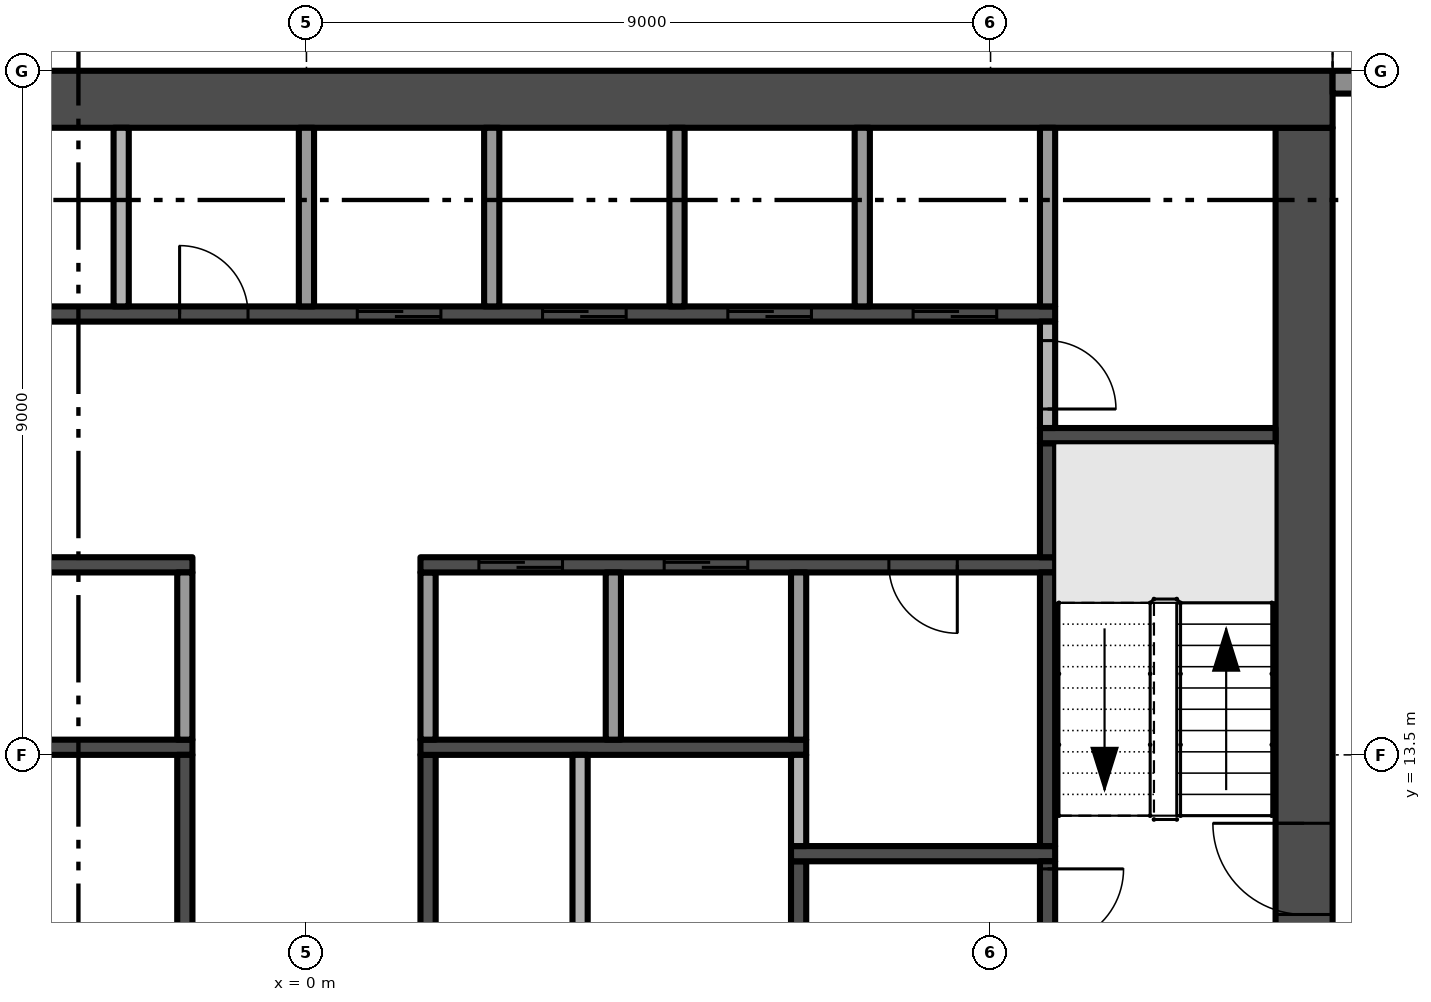
"""IFC4 building model, lengths in metres.
Left out: names, types, materials, properties, quantities, classifications, styles, units other than length and angle.
Written with IfcOpenShell. Run it as: python <this file> out.ifc"""

import sys

from ifc_helpers import new_model, si_unit, direction, frame, frame_2d, origin, place, context, subcontext, project, spatial, rectangle, extrude, element, fill, save


model = new_model("IFC4")
c1 = context("Model", 3, precision=1e-05, world=origin(), true_north=direction((0.0, 1.0)))
c2 = subcontext(c1, "Body", "Model", "MODEL_VIEW")
j1 = project(units=[si_unit("LENGTHUNIT", "METRE"), si_unit("PLANEANGLEUNIT", "RADIAN")], contexts=[c1])
p1 = place(None, origin())
s1 = spatial("IfcSite", under=j1, at=p1, CompositionType="ELEMENT")
p2 = place(p1, origin())
s2 = spatial("IfcBuilding", under=s1, at=p2, CompositionType="ELEMENT")
p3 = place(p2, frame((0.0, 0.0, 163.0)))
s3 = spatial("IfcBuildingStorey", under=s2, at=p3, CompositionType="ELEMENT", Elevation=163.0)
p4 = place(p3, frame((13.125, 5.25, -0.3), z_axis=(0.0, 0.0, 1.0), x_axis=(0.0, 1.0, 0.0)))
e1 = element("IfcWall", 1, at=p4, inside=s3, PredefinedType="SHEAR", context=c2, shape_type="SweptSolid", body=[
    extrude(rectangle(XDim=16.5, YDim=0.75, at=frame_2d((8.25, 0.0))), origin(), (0.0, 0.0, 1.0), 3.8),
])
p5 = place(p4, frame((6.15, 0.0, 0.3)))
e2 = element("IfcOpeningElement", 2, at=p5, cuts=e1, PredefinedType="OPENING", context=c2, shape_type="SweptSolid", body=[
    extrude(rectangle(XDim=1.2, YDim=2.2, at=frame_2d((0.6, 1.1))), frame((0.0, 0.385, 0.0), z_axis=(0.0, -1.0, 0.0), x_axis=(1.0, 0.0, 0.0)), (0.0, 0.0, 1.0), 0.77),
])
p6 = place(p3, frame((13.5, 22.125, -0.3), z_axis=(0.0, 0.0, 1.0), x_axis=(-1.0, 0.0, 0.0)))
e3 = element("IfcWall", 3, at=p6, inside=s3, PredefinedType="SHEAR", context=c2, shape_type="SweptSolid", body=[
    extrude(rectangle(XDim=27.0, YDim=0.75, at=frame_2d((13.5, 0.0))), origin(), (0.0, 0.0, 1.0), 3.8),
])
p7 = place(p3, frame((13.5, 22.35, 0.0), z_axis=(0.0, 0.0, 1.0), x_axis=(1.0, 0.0, 0.0)))
e4 = element("IfcWall", 4, at=p7, inside=s3, PredefinedType="SOLIDWALL", context=c2, shape_type="SweptSolid", body=[
    extrude(rectangle(XDim=3.4, YDim=0.3, at=frame_2d((1.7, 0.0))), origin(), (0.0, 0.0, 1.0), 3.5),
])
p8 = place(p7, frame((2.05, 0.0, 0.45)))
e5 = element("IfcOpeningElement", 5, at=p8, cuts=e4, PredefinedType="OPENING", context=c2, shape_type="SweptSolid", body=[
    extrude(rectangle(XDim=1.05, YDim=2.65, at=frame_2d((0.525, 1.325))), frame((0.0, 0.16, 0.0), z_axis=(0.0, -1.0, 0.0), x_axis=(1.0, 0.0, 0.0)), (0.0, 0.0, 1.0), 0.32),
])
p9 = place(p7, frame((0.7, 0.0, 0.0)))
e6 = element("IfcOpeningElement", 6, at=p9, cuts=e4, PredefinedType="OPENING", context=c2, shape_type="SweptSolid", body=[
    extrude(rectangle(XDim=1.2, YDim=2.4, at=frame_2d((0.6, 1.2))), frame((0.0, 0.16, 0.0), z_axis=(0.0, -1.0, 0.0), x_axis=(1.0, 0.0, 0.0)), (0.0, 0.0, 1.0), 0.32),
])
p10 = place(p3, frame((-9.85, 13.6, 0.0), z_axis=(0.0, 0.0, 1.0), x_axis=(1.0, 0.0, 0.0)))
e7 = element("IfcWall", 7, at=p10, inside=s3, PredefinedType="SHEAR", context=c2, shape_type="SweptSolid", body=[
    extrude(rectangle(XDim=8.35, YDim=0.2, at=frame_2d((4.175, 0.0))), origin(), (0.0, 0.0, 1.0), 3.5),
])
p11 = place(p3, frame((-1.5, 16.0, 0.0), z_axis=(0.0, 0.0, 1.0), x_axis=(-1.0, 0.0, 0.0)))
e8 = element("IfcWall", 8, at=p11, inside=s3, PredefinedType="SHEAR", context=c2, shape_type="SweptSolid", body=[
    extrude(rectangle(XDim=8.35, YDim=0.2, at=frame_2d((4.175, 0.0))), origin(), (0.0, 0.0, 1.0), 3.5),
])
p12 = place(p11, frame((6.162, 0.0, 0.0)))
e9 = element("IfcOpeningElement", 9, at=p12, cuts=e8, PredefinedType="OPENING", context=c2, shape_type="SweptSolid", body=[
    extrude(rectangle(XDim=0.9, YDim=2.1, at=frame_2d((0.45, 1.05))), frame((0.0, 0.11, 0.0), z_axis=(0.0, -1.0, 0.0), x_axis=(1.0, 0.0, 0.0)), (0.0, 0.0, 1.0), 0.22),
])
p13 = place(p3, frame((-9.85, 19.3, 0.0), z_axis=(0.0, 0.0, 1.0), x_axis=(1.0, 0.0, 0.0)))
e10 = element("IfcWall", 10, at=p13, inside=s3, PredefinedType="SHEAR", context=c2, shape_type="SweptSolid", body=[
    extrude(rectangle(XDim=19.7, YDim=0.2, at=frame_2d((9.85, 0.0))), origin(), (0.0, 0.0, 1.0), 3.5),
])
p14 = place(p13, frame((10.519, 0.0, 0.0)))
e11 = element("IfcOpeningElement", 11, at=p14, cuts=e10, PredefinedType="OPENING", context=c2, shape_type="SweptSolid", body=[
    extrude(rectangle(XDim=1.1, YDim=2.1, at=frame_2d((0.55, 1.05))), frame((0.0, 0.11, 0.0), z_axis=(0.0, -1.0, 0.0), x_axis=(1.0, 0.0, 0.0)), (0.0, 0.0, 1.0), 0.22),
])
p15 = place(p13, frame((12.956, 0.0, 0.0)))
e12 = element("IfcOpeningElement", 12, at=p15, cuts=e10, PredefinedType="OPENING", context=c2, shape_type="SweptSolid", body=[
    extrude(rectangle(XDim=1.1, YDim=2.1, at=frame_2d((0.55, 1.05))), frame((0.0, 0.11, 0.0), z_axis=(0.0, -1.0, 0.0), x_axis=(1.0, 0.0, 0.0)), (0.0, 0.0, 1.0), 0.22),
])
p16 = place(p13, frame((15.394, 0.0, 0.0)))
e13 = element("IfcOpeningElement", 13, at=p16, cuts=e10, PredefinedType="OPENING", context=c2, shape_type="SweptSolid", body=[
    extrude(rectangle(XDim=1.1, YDim=2.1, at=frame_2d((0.55, 1.05))), frame((0.0, 0.11, 0.0), z_axis=(0.0, -1.0, 0.0), x_axis=(1.0, 0.0, 0.0)), (0.0, 0.0, 1.0), 0.22),
])
p17 = place(p13, frame((17.831, 0.0, 0.0)))
e14 = element("IfcOpeningElement", 14, at=p17, cuts=e10, PredefinedType="OPENING", context=c2, shape_type="SweptSolid", body=[
    extrude(rectangle(XDim=1.1, YDim=2.1, at=frame_2d((0.55, 1.05))), frame((0.0, 0.11, 0.0), z_axis=(0.0, -1.0, 0.0), x_axis=(1.0, 0.0, 0.0)), (0.0, 0.0, 1.0), 0.22),
])
p18 = place(p13, frame((0.869, 0.0, 0.0)))
e15 = element("IfcOpeningElement", 15, at=p18, cuts=e10, PredefinedType="OPENING", context=c2, shape_type="SweptSolid", body=[
    extrude(rectangle(XDim=0.9, YDim=2.1, at=frame_2d((0.45, 1.05))), frame((0.0, 0.11, 0.0), z_axis=(0.0, -1.0, 0.0), x_axis=(1.0, 0.0, 0.0)), (0.0, 0.0, 1.0), 0.22),
])
p19 = place(p13, frame((4.525, 0.0, 0.0)))
e16 = element("IfcOpeningElement", 16, at=p19, cuts=e10, PredefinedType="OPENING", context=c2, shape_type="SweptSolid", body=[
    extrude(rectangle(XDim=0.9, YDim=2.1, at=frame_2d((0.45, 1.05))), frame((0.0, 0.11, 0.0), z_axis=(0.0, -1.0, 0.0), x_axis=(1.0, 0.0, 0.0)), (0.0, 0.0, 1.0), 0.22),
])
p20 = place(p13, frame((8.181, 0.0, 0.0)))
e17 = element("IfcOpeningElement", 17, at=p20, cuts=e10, PredefinedType="OPENING", context=c2, shape_type="SweptSolid", body=[
    extrude(rectangle(XDim=0.9, YDim=2.1, at=frame_2d((0.45, 1.05))), frame((0.0, 0.11, 0.0), z_axis=(0.0, -1.0, 0.0), x_axis=(1.0, 0.0, 0.0)), (0.0, 0.0, 1.0), 0.22),
])
p21 = place(p3, frame((-2.438, 19.4, 0.0), z_axis=(0.0, 0.0, 1.0), x_axis=(0.0, 1.0, 0.0)))
e18 = element("IfcWall", 18, at=p21, inside=s3, PredefinedType="PARTITIONING", context=c2, shape_type="SweptSolid", body=[
    extrude(rectangle(XDim=2.35, YDim=0.2, at=frame_2d((1.175, 0.0))), origin(), (0.0, 0.0, 1.0), 3.5),
])
p22 = place(p3, frame((-1.6, 8.15, 0.0), z_axis=(0.0, 0.0, 1.0), x_axis=(0.0, 1.0, 0.0)))
e19 = element("IfcWall", 19, at=p22, inside=s3, PredefinedType="SHEAR", context=c2, shape_type="SweptSolid", body=[
    extrude(rectangle(XDim=5.35, YDim=0.2, at=frame_2d((2.675, 0.0))), origin(), (0.0, 0.0, 1.0), 3.5),
])
p23 = place(p22, frame((2.225, 0.0, 0.0)))
e20 = element("IfcOpeningElement", 20, at=p23, cuts=e19, PredefinedType="OPENING", context=c2, shape_type="SweptSolid", body=[
    extrude(rectangle(XDim=0.9, YDim=2.1, at=frame_2d((0.45, 1.05))), frame((0.0, 0.11, 0.0), z_axis=(0.0, -1.0, 0.0), x_axis=(1.0, 0.0, 0.0)), (0.0, 0.0, 1.0), 0.22),
])
p24 = place(p3, frame((-1.6, 13.7, 0.0), z_axis=(0.0, 0.0, 1.0), x_axis=(0.0, 1.0, 0.0)))
e21 = element("IfcWall", 21, at=p24, inside=s3, PredefinedType="PARTITIONING", context=c2, shape_type="SweptSolid", body=[
    extrude(rectangle(XDim=2.2, YDim=0.2, at=frame_2d((1.1, 0.0))), origin(), (0.0, 0.0, 1.0), 3.5),
])
p25 = place(p3, frame((0.0, 19.4, 0.0), z_axis=(0.0, 0.0, 1.0), x_axis=(0.0, 1.0, 0.0)))
e22 = element("IfcWall", 22, at=p25, inside=s3, PredefinedType="PARTITIONING", context=c2, shape_type="SweptSolid", body=[
    extrude(rectangle(XDim=2.35, YDim=0.2, at=frame_2d((1.175, 0.0))), origin(), (0.0, 0.0, 1.0), 3.5),
])
p26 = place(p3, frame((1.6, 13.5, 0.0), z_axis=(0.0, 0.0, 1.0), x_axis=(0.0, -1.0, 0.0)))
e23 = element("IfcWall", 23, at=p26, inside=s3, PredefinedType="SHEAR", context=c2, shape_type="SweptSolid", body=[
    extrude(rectangle(XDim=8.25, YDim=0.2, at=frame_2d((4.125, 0.0))), origin(), (0.0, 0.0, 1.0), 3.5),
])
p27 = place(p26, frame((3.275, 0.0, 0.0)))
e24 = element("IfcOpeningElement", 24, at=p27, cuts=e23, PredefinedType="OPENING", context=c2, shape_type="SweptSolid", body=[
    extrude(rectangle(XDim=0.9, YDim=2.1, at=frame_2d((0.45, 1.05))), frame((0.0, 0.11, 0.0), z_axis=(0.0, -1.0, 0.0), x_axis=(1.0, 0.0, 0.0)), (0.0, 0.0, 1.0), 0.22),
])
p28 = place(p3, frame((1.5, 13.6, 0.0), z_axis=(0.0, 0.0, 1.0), x_axis=(1.0, 0.0, 0.0)))
e25 = element("IfcWall", 25, at=p28, inside=s3, PredefinedType="SHEAR", context=c2, shape_type="SweptSolid", body=[
    extrude(rectangle(XDim=5.075, YDim=0.2, at=frame_2d((2.538, 0.0))), origin(), (0.0, 0.0, 1.0), 3.5),
])
p29 = place(p3, frame((1.6, 13.7, 0.0), z_axis=(0.0, 0.0, 1.0), x_axis=(0.0, 1.0, 0.0)))
e26 = element("IfcWall", 26, at=p29, inside=s3, PredefinedType="PARTITIONING", context=c2, shape_type="SweptSolid", body=[
    extrude(rectangle(XDim=2.2, YDim=0.2, at=frame_2d((1.1, 0.0))), origin(), (0.0, 0.0, 1.0), 3.5),
])
p30 = place(p3, frame((9.85, 16.0, 0.0), z_axis=(0.0, 0.0, 1.0), x_axis=(-1.0, 0.0, 0.0)))
e27 = element("IfcWall", 27, at=p30, inside=s3, PredefinedType="SHEAR", context=c2, shape_type="SweptSolid", body=[
    extrude(rectangle(XDim=8.35, YDim=0.2, at=frame_2d((4.175, 0.0))), origin(), (0.0, 0.0, 1.0), 3.5),
])
p31 = place(p30, frame((6.481, 0.0, 0.0)))
e28 = element("IfcOpeningElement", 28, at=p31, cuts=e27, PredefinedType="OPENING", context=c2, shape_type="SweptSolid", body=[
    extrude(rectangle(XDim=1.1, YDim=2.1, at=frame_2d((0.55, 1.05))), frame((0.0, 0.11, 0.0), z_axis=(0.0, -1.0, 0.0), x_axis=(1.0, 0.0, 0.0)), (0.0, 0.0, 1.0), 0.22),
])
p32 = place(p30, frame((4.044, 0.0, 0.0)))
e29 = element("IfcOpeningElement", 29, at=p32, cuts=e27, PredefinedType="OPENING", context=c2, shape_type="SweptSolid", body=[
    extrude(rectangle(XDim=1.1, YDim=2.1, at=frame_2d((0.55, 1.05))), frame((0.0, 0.11, 0.0), z_axis=(0.0, -1.0, 0.0), x_axis=(1.0, 0.0, 0.0)), (0.0, 0.0, 1.0), 0.22),
])
p33 = place(p30, frame((1.288, 0.0, 0.0)))
e30 = element("IfcOpeningElement", 30, at=p33, cuts=e27, PredefinedType="OPENING", context=c2, shape_type="SweptSolid", body=[
    extrude(rectangle(XDim=0.9, YDim=2.1, at=frame_2d((0.45, 1.05))), frame((0.0, 0.11, 0.0), z_axis=(0.0, -1.0, 0.0), x_axis=(1.0, 0.0, 0.0)), (0.0, 0.0, 1.0), 0.22),
])
p34 = place(p3, frame((2.438, 19.4, 0.0), z_axis=(0.0, 0.0, 1.0), x_axis=(0.0, 1.0, 0.0)))
e31 = element("IfcWall", 31, at=p34, inside=s3, PredefinedType="PARTITIONING", context=c2, shape_type="SweptSolid", body=[
    extrude(rectangle(XDim=2.35, YDim=0.2, at=frame_2d((1.175, 0.0))), origin(), (0.0, 0.0, 1.0), 3.5),
])
p35 = place(p3, frame((3.6, 13.5, 0.0), z_axis=(0.0, 0.0, 1.0), x_axis=(0.0, -1.0, 0.0)))
e32 = element("IfcWall", 32, at=p35, inside=s3, PredefinedType="PARTITIONING", context=c2, shape_type="SweptSolid", body=[
    extrude(rectangle(XDim=8.25, YDim=0.2, at=frame_2d((4.125, 0.0))), origin(), (0.0, 0.0, 1.0), 3.5),
])
p36 = place(p35, frame((3.675, 0.0, 0.0)))
e33 = element("IfcOpeningElement", 33, at=p36, cuts=e32, PredefinedType="OPENING", context=c2, shape_type="SweptSolid", body=[
    extrude(rectangle(XDim=0.9, YDim=2.1, at=frame_2d((0.45, 1.05))), frame((0.0, 0.11, 0.0), z_axis=(0.0, -1.0, 0.0), x_axis=(1.0, 0.0, 0.0)), (0.0, 0.0, 1.0), 0.22),
])
p37 = place(p3, frame((4.037, 13.7, 0.0), z_axis=(0.0, 0.0, 1.0), x_axis=(0.0, 1.0, 0.0)))
e34 = element("IfcWall", 34, at=p37, inside=s3, PredefinedType="PARTITIONING", context=c2, shape_type="SweptSolid", body=[
    extrude(rectangle(XDim=2.2, YDim=0.2, at=frame_2d((1.1, 0.0))), origin(), (0.0, 0.0, 1.0), 3.5),
])
p38 = place(p3, frame((4.875, 19.4, 0.0), z_axis=(0.0, 0.0, 1.0), x_axis=(0.0, 1.0, 0.0)))
e35 = element("IfcWall", 35, at=p38, inside=s3, PredefinedType="PARTITIONING", context=c2, shape_type="SweptSolid", body=[
    extrude(rectangle(XDim=2.35, YDim=0.2, at=frame_2d((1.175, 0.0))), origin(), (0.0, 0.0, 1.0), 3.5),
])
p39 = place(p3, frame((6.475, 5.25, 0.0), z_axis=(0.0, 0.0, 1.0), x_axis=(0.0, 1.0, 0.0)))
e36 = element("IfcWall", 36, at=p39, inside=s3, PredefinedType="SHEAR", context=c2, shape_type="SweptSolid", body=[
    extrude(rectangle(XDim=6.85, YDim=0.2, at=frame_2d((3.425, 0.0))), origin(), (0.0, 0.0, 1.0), 3.5),
])
p40 = place(p3, frame((6.375, 12.2, 0.0), z_axis=(0.0, 0.0, 1.0), x_axis=(1.0, 0.0, 0.0)))
e37 = element("IfcWall", 37, at=p40, inside=s3, PredefinedType="SHEAR", context=c2, shape_type="SweptSolid", body=[
    extrude(rectangle(XDim=3.475, YDim=0.2, at=frame_2d((1.738, 0.0))), origin(), (0.0, 0.0, 1.0), 3.5),
])
p41 = place(p3, frame((6.475, 12.3, 0.0), z_axis=(0.0, 0.0, 1.0), x_axis=(0.0, 1.0, 0.0)))
e38 = element("IfcWall", 38, at=p41, inside=s3, PredefinedType="PARTITIONING", context=c2, shape_type="SweptSolid", body=[
    extrude(rectangle(XDim=1.2, YDim=0.2, at=frame_2d((0.6, 0.0))), origin(), (0.0, 0.0, 1.0), 3.5),
])
p42 = place(p3, frame((6.475, 13.7, 0.0), z_axis=(0.0, 0.0, 1.0), x_axis=(0.0, 1.0, 0.0)))
e39 = element("IfcWall", 39, at=p42, inside=s3, PredefinedType="PARTITIONING", context=c2, shape_type="SweptSolid", body=[
    extrude(rectangle(XDim=2.2, YDim=0.2, at=frame_2d((1.1, 0.0))), origin(), (0.0, 0.0, 1.0), 3.5),
])
p43 = place(p3, frame((7.312, 19.4, 0.0), z_axis=(0.0, 0.0, 1.0), x_axis=(0.0, 1.0, 0.0)))
e40 = element("IfcWall", 40, at=p43, inside=s3, PredefinedType="PARTITIONING", context=c2, shape_type="SweptSolid", body=[
    extrude(rectangle(XDim=2.35, YDim=0.2, at=frame_2d((1.175, 0.0))), origin(), (0.0, 0.0, 1.0), 3.5),
])
p44 = place(p3, frame((9.75, 12.1, 0.0), z_axis=(0.0, 0.0, 1.0), x_axis=(0.0, -1.0, 0.0)))
e41 = element("IfcWall", 41, at=p44, inside=s3, PredefinedType="SHEAR", context=c2, shape_type="SweptSolid", body=[
    extrude(rectangle(XDim=1.9, YDim=0.2, at=frame_2d((0.95, 0.0))), origin(), (0.0, 0.0, 1.0), 3.5),
])
p45 = place(p44, frame((0.1, 0.0, 0.0)))
e42 = element("IfcOpeningElement", 42, at=p45, cuts=e41, PredefinedType="OPENING", context=c2, shape_type="SweptSolid", body=[
    extrude(rectangle(XDim=1.0, YDim=2.2, at=frame_2d((0.5, 1.1))), frame((0.0, 0.11, 0.0), z_axis=(0.0, -1.0, 0.0), x_axis=(1.0, 0.0, 0.0)), (0.0, 0.0, 1.0), 0.22),
])
p46 = place(p3, frame((9.75, 12.3, 0.0), z_axis=(0.0, 0.0, 1.0), x_axis=(0.0, 1.0, 0.0)))
e43 = element("IfcWall", 43, at=p46, inside=s3, PredefinedType="SHEAR", context=c2, shape_type="SweptSolid", body=[
    extrude(rectangle(XDim=3.6, YDim=0.2, at=frame_2d((1.8, 0.0))), origin(), (0.0, 0.0, 1.0), 3.5),
])
p47 = place(p3, frame((9.75, 16.1, 0.0), z_axis=(0.0, 0.0, 1.0), x_axis=(0.0, 1.0, 0.0)))
e44 = element("IfcWall", 44, at=p47, inside=s3, PredefinedType="SHEAR", context=c2, shape_type="SweptSolid", body=[
    extrude(rectangle(XDim=1.5, YDim=0.2, at=frame_2d((0.75, 0.0))), origin(), (0.0, 0.0, 1.0), 3.5),
])
p48 = place(p3, frame((9.65, 17.7, 0.0), z_axis=(0.0, 0.0, 1.0), x_axis=(1.0, 0.0, 0.0)))
e45 = element("IfcWall", 45, at=p48, inside=s3, PredefinedType="SHEAR", context=c2, shape_type="SweptSolid", body=[
    extrude(rectangle(XDim=3.1, YDim=0.2, at=frame_2d((1.55, 0.0))), origin(), (0.0, 0.0, 1.0), 3.5),
])
p49 = place(p3, frame((9.75, 19.2, 0.0), z_axis=(0.0, 0.0, 1.0), x_axis=(0.0, -1.0, 0.0)))
e46 = element("IfcWall", 46, at=p49, inside=s3, PredefinedType="PARTITIONING", context=c2, shape_type="SweptSolid", body=[
    extrude(rectangle(XDim=1.4, YDim=0.2, at=frame_2d((0.7, 0.0))), origin(), (0.0, 0.0, 1.0), 3.5),
])
p50 = place(p49, frame((0.25, 0.0, 0.0)))
e47 = element("IfcOpeningElement", 47, at=p50, cuts=e46, PredefinedType="OPENING", context=c2, shape_type="SweptSolid", body=[
    extrude(rectangle(XDim=0.9, YDim=2.1, at=frame_2d((0.45, 1.05))), frame((0.0, 0.11, 0.0), z_axis=(0.0, -1.0, 0.0), x_axis=(1.0, 0.0, 0.0)), (0.0, 0.0, 1.0), 0.22),
])
p51 = place(p3, frame((9.75, 19.4, 0.0), z_axis=(0.0, 0.0, 1.0), x_axis=(0.0, 1.0, 0.0)))
e48 = element("IfcWall", 48, at=p51, inside=s3, PredefinedType="PARTITIONING", context=c2, shape_type="SweptSolid", body=[
    extrude(rectangle(XDim=2.35, YDim=0.2, at=frame_2d((1.175, 0.0))), origin(), (0.0, 0.0, 1.0), 3.5),
])
p52 = place(p5, frame((1.2, 0.0, 0.0), z_axis=(0.0, 0.0, 1.0), x_axis=(-1.0, 0.0, 0.0)))
e49 = element("IfcDoor", 49, at=p52, inside=s3, OperationType="SINGLE_SWING_LEFT", PredefinedType="DOOR", context=c2, shape_type="SweptSolid", body=[
    extrude(rectangle(XDim=1.2, YDim=2.2, at=frame_2d((0.6, 1.1))), frame((0.0, 0.025, 0.0), z_axis=(0.0, -1.0, 0.0), x_axis=(1.0, 0.0, 0.0)), (0.0, 0.0, 1.0), 0.05),
])
fill(e2, e49)
p53 = place(p45, origin())
e50 = element("IfcDoor", 50, at=p53, inside=s3, OperationType="SINGLE_SWING_LEFT", PredefinedType="DOOR", context=c2, shape_type="SweptSolid", body=[
    extrude(rectangle(XDim=1.0, YDim=2.2, at=frame_2d((0.5, 1.1))), frame((0.0, 0.025, 0.0), z_axis=(0.0, -1.0, 0.0), x_axis=(1.0, 0.0, 0.0)), (0.0, 0.0, 1.0), 0.05),
])
fill(e42, e50)
p54 = place(p14, origin())
e51 = element("IfcDoor", 51, at=p54, inside=s3, OperationType="SLIDING_TO_RIGHT", PredefinedType="DOOR", context=c2, shape_type="SweptSolid", body=[
    extrude(rectangle(XDim=1.1, YDim=2.1, at=frame_2d((0.55, 1.05))), frame((0.0, 0.025, 0.0), z_axis=(0.0, -1.0, 0.0), x_axis=(1.0, 0.0, 0.0)), (0.0, 0.0, 1.0), 0.05),
])
fill(e11, e51)
p55 = place(p15, origin())
e52 = element("IfcDoor", 52, at=p55, inside=s3, OperationType="SLIDING_TO_RIGHT", PredefinedType="DOOR", context=c2, shape_type="SweptSolid", body=[
    extrude(rectangle(XDim=1.1, YDim=2.1, at=frame_2d((0.55, 1.05))), frame((0.0, 0.025, 0.0), z_axis=(0.0, -1.0, 0.0), x_axis=(1.0, 0.0, 0.0)), (0.0, 0.0, 1.0), 0.05),
])
fill(e12, e52)
p56 = place(p16, origin())
e53 = element("IfcDoor", 53, at=p56, inside=s3, OperationType="SLIDING_TO_RIGHT", PredefinedType="DOOR", context=c2, shape_type="SweptSolid", body=[
    extrude(rectangle(XDim=1.1, YDim=2.1, at=frame_2d((0.55, 1.05))), frame((0.0, 0.025, 0.0), z_axis=(0.0, -1.0, 0.0), x_axis=(1.0, 0.0, 0.0)), (0.0, 0.0, 1.0), 0.05),
])
fill(e13, e53)
p57 = place(p17, origin())
e54 = element("IfcDoor", 54, at=p57, inside=s3, OperationType="SLIDING_TO_RIGHT", PredefinedType="DOOR", context=c2, shape_type="SweptSolid", body=[
    extrude(rectangle(XDim=1.1, YDim=2.1, at=frame_2d((0.55, 1.05))), frame((0.0, 0.025, 0.0), z_axis=(0.0, -1.0, 0.0), x_axis=(1.0, 0.0, 0.0)), (0.0, 0.0, 1.0), 0.05),
])
fill(e14, e54)
p58 = place(p31, origin())
e55 = element("IfcDoor", 55, at=p58, inside=s3, OperationType="SLIDING_TO_RIGHT", PredefinedType="DOOR", context=c2, shape_type="SweptSolid", body=[
    extrude(rectangle(XDim=1.1, YDim=2.1, at=frame_2d((0.55, 1.05))), frame((0.0, 0.025, 0.0), z_axis=(0.0, -1.0, 0.0), x_axis=(1.0, 0.0, 0.0)), (0.0, 0.0, 1.0), 0.05),
])
fill(e28, e55)
p59 = place(p32, origin())
e56 = element("IfcDoor", 56, at=p59, inside=s3, OperationType="SLIDING_TO_RIGHT", PredefinedType="DOOR", context=c2, shape_type="SweptSolid", body=[
    extrude(rectangle(XDim=1.1, YDim=2.1, at=frame_2d((0.55, 1.05))), frame((0.0, 0.025, 0.0), z_axis=(0.0, -1.0, 0.0), x_axis=(1.0, 0.0, 0.0)), (0.0, 0.0, 1.0), 0.05),
])
fill(e29, e56)
p60 = place(p33, origin())
e57 = element("IfcDoor", 57, at=p60, inside=s3, OperationType="SINGLE_SWING_LEFT", PredefinedType="DOOR", context=c2, shape_type="SweptSolid", body=[
    extrude(rectangle(XDim=0.9, YDim=2.1, at=frame_2d((0.45, 1.05))), frame((0.0, 0.025, 0.0), z_axis=(0.0, -1.0, 0.0), x_axis=(1.0, 0.0, 0.0)), (0.0, 0.0, 1.0), 0.05),
])
fill(e30, e57)
p61 = place(p50, origin())
e58 = element("IfcDoor", 58, at=p61, inside=s3, OperationType="SINGLE_SWING_RIGHT", PredefinedType="DOOR", context=c2, shape_type="SweptSolid", body=[
    extrude(rectangle(XDim=0.9, YDim=2.1, at=frame_2d((0.45, 1.05))), frame((0.0, 0.025, 0.0), z_axis=(0.0, -1.0, 0.0), x_axis=(1.0, 0.0, 0.0)), (0.0, 0.0, 1.0), 0.05),
])
fill(e47, e58)
p62 = place(p20, origin())
e59 = element("IfcDoor", 59, at=p62, inside=s3, OperationType="SINGLE_SWING_LEFT", PredefinedType="DOOR", context=c2, shape_type="SweptSolid", body=[
    extrude(rectangle(XDim=0.9, YDim=2.1, at=frame_2d((0.45, 1.05))), frame((0.0, 0.025, 0.0), z_axis=(0.0, -1.0, 0.0), x_axis=(1.0, 0.0, 0.0)), (0.0, 0.0, 1.0), 0.05),
])
fill(e17, e59)
save(model, sys.argv[1])
